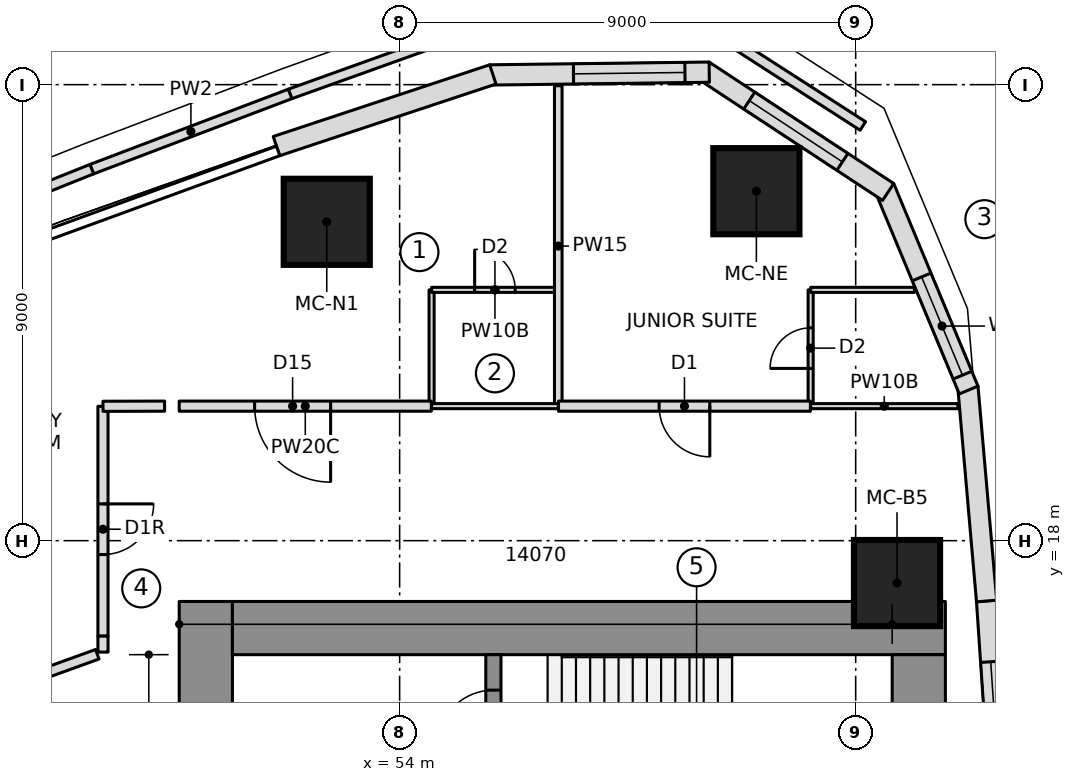
"""IFC4 building model, lengths in metres.
Left out: names, types, materials, properties, quantities, classifications, styles, units other than length and angle.
Written with IfcOpenShell. Run it as: python <this file> out.ifc"""

import sys

from ifc_helpers import new_model, si_unit, direction, frame, frame_2d, origin, origin_2d, place, context, subcontext, project, spatial, polyline, rectangle, outline, extrude, element, fill, save


model = new_model("IFC4")
c1 = context("Model", 3, precision=1e-05, world=origin(), true_north=direction((0.0, 1.0)))
c2 = subcontext(c1, "Body", "Model", "MODEL_VIEW")
j1 = project(units=[si_unit("LENGTHUNIT", "METRE"), si_unit("PLANEANGLEUNIT", "RADIAN")], contexts=[c1])
p1 = place(None, origin())
s1 = spatial("IfcSite", under=j1, at=p1, CompositionType="ELEMENT")
p2 = place(p1, origin())
s2 = spatial("IfcBuilding", under=s1, at=p2, CompositionType="ELEMENT")
p3 = place(p2, frame((0.0, 0.0, 80.3)))
s3 = spatial("IfcBuildingStorey", under=s2, at=p3, CompositionType="ELEMENT", Elevation=80.3)
p4 = place(p3, frame((50.175, 6.65, 0.0), z_axis=(0.0, 0.0, 1.0), x_axis=(0.0, 1.0, 0.0)))
e1 = element("IfcWall", 1, at=p4, inside=s3, PredefinedType="SHEAR", context=c2, shape_type="SweptSolid", body=[
    extrude(rectangle(XDim=10.15, YDim=1.05, at=frame_2d((5.075, 0.0))), origin(), (0.0, 0.0, 1.0), 4.6),
])
p5 = place(p4, frame((6.5, 0.0, 0.0)))
e2 = element("IfcOpeningElement", 2, at=p5, cuts=e1, PredefinedType="OPENING", context=c2, shape_type="SweptSolid", body=[
    extrude(rectangle(XDim=1.1, YDim=2.1, at=frame_2d((0.55, 1.05))), frame((0.0, 0.535, 0.0), z_axis=(0.0, -1.0, 0.0), x_axis=(1.0, 0.0, 0.0)), (0.0, 0.0, 1.0), 1.07),
])
p6 = place(p3, frame((50.7, 16.275, 0.0), z_axis=(0.0, 0.0, 1.0), x_axis=(1.0, 0.0, 0.0)))
e3 = element("IfcWall", 3, at=p6, inside=s3, PredefinedType="SHEAR", context=c2, shape_type="SweptSolid", body=[
    extrude(rectangle(XDim=14.07, YDim=1.05, at=frame_2d((7.035, 0.0))), origin(), (0.0, 0.0, 1.0), 4.6),
])
p7 = place(p3, frame((64.245, 9.389, 0.0), z_axis=(0.0, 0.0, 1.0), x_axis=(0.0, 1.0, 0.0)))
e4 = element("IfcWall", 4, at=p7, inside=s3, PredefinedType="SHEAR", context=c2, shape_type="SweptSolid", body=[
    extrude(rectangle(XDim=6.361, YDim=1.05, at=frame_2d((3.181, 0.0))), origin(), (0.0, 0.0, 1.0), 4.6),
])
p8 = place(p3, frame((55.85, 10.35, 0.0), z_axis=(0.0, 0.0, 1.0), x_axis=(0.0, 1.0, 0.0)))
e5 = element("IfcWall", 5, at=p8, inside=s3, PredefinedType="SHEAR", context=c2, shape_type="SweptSolid", body=[
    extrude(rectangle(XDim=5.4, YDim=0.3, at=frame_2d((2.7, 0.0))), origin(), (0.0, 0.0, 1.0), 4.6),
])
p9 = place(p8, frame((1.43, 0.0, 0.0)))
e6 = element("IfcOpeningElement", 6, at=p9, cuts=e5, PredefinedType="OPENING", context=c2, shape_type="SweptSolid", body=[
    extrude(rectangle(XDim=1.1, YDim=2.1, at=frame_2d((0.55, 1.05))), frame((0.0, 0.16, 0.0), z_axis=(0.0, -1.0, 0.0), x_axis=(1.0, 0.0, 0.0)), (0.0, 0.0, 1.0), 0.32),
])
p10 = place(p8, frame((3.6, 0.0, 0.0)))
e7 = element("IfcOpeningElement", 7, at=p10, cuts=e5, PredefinedType="OPENING", context=c2, shape_type="SweptSolid", body=[
    extrude(rectangle(XDim=1.1, YDim=2.1, at=frame_2d((0.55, 1.05))), frame((0.0, 0.16, 0.0), z_axis=(0.0, -1.0, 0.0), x_axis=(1.0, 0.0, 0.0)), (0.0, 0.0, 1.0), 0.32),
])
for number, where, z_axis, x_axis in (
    (8, (63.816, 17.164, 0.0), (0.0, 0.0, 1.0), (1.0, 0.0, 0.0)),
    (9, (61.04, 24.897, 0.0), (0.0, 0.0, 1.0), (1.0, 0.0, 0.0)),
    (10, (52.562, 24.293, 0.0), (0.0, 0.0, 1.0), (1.0, 0.0, 0.0)),
):
    element("IfcColumn", number, at=place(p3, frame(where, z_axis=z_axis, x_axis=x_axis)), inside=s3, PredefinedType="COLUMN", context=c2, shape_type="SweptSolid", body=[
        extrude(rectangle(XDim=1.7, YDim=1.7, at=origin_2d()), origin(), (0.0, 0.0, 1.0), 4.6),
    ])
p11 = place(p3, frame((65.868, 12.614, 0.0), z_axis=(0.0, 0.0, 1.0), x_axis=(-0.067724559895, 0.997704056315, 0.0)))
e11 = element("IfcWall", 11, at=p11, inside=s3, PredefinedType="NOTDEFINED", context=c2, shape_type="SweptSolid", body=[
    extrude(outline(polyline([(-0.002, -0.2), (4.209, -0.2), (4.205, 0.2), (0.002, 0.2), (-0.002, -0.2)])), origin(), (0.0, 0.0, 1.0), 4.3),
])
p12 = place(p11, frame((1.203, 0.0, 1.8)))
e12 = element("IfcOpeningElement", 12, at=p12, cuts=e11, PredefinedType="OPENING", context=c2, shape_type="SweptSolid", body=[
    extrude(rectangle(XDim=1.8, YDim=1.2, at=frame_2d((0.9, 0.6))), frame((0.0, 0.21, 0.0), z_axis=(0.0, -1.0, 0.0), x_axis=(1.0, 0.0, 0.0)), (0.0, 0.0, 1.0), 0.42),
])
p13 = place(p3, frame((65.583, 16.811, 0.0), z_axis=(0.0, 0.0, 1.0), x_axis=(-0.086992730434, 0.996208946382, 0.0)))
e13 = element("IfcWall", 13, at=p13, inside=s3, PredefinedType="NOTDEFINED", context=c2, shape_type="SweptSolid", body=[
    extrude(outline(polyline([(-0.002, -0.2), (4.238, -0.2), (4.176, 0.2), (0.002, 0.2), (-0.002, -0.2)])), origin(), (0.0, 0.0, 1.0), 4.3),
])
p14 = place(p3, frame((65.217, 21.002, 0.0), z_axis=(0.0, 0.0, 1.0), x_axis=(-0.383997751971, 0.923334027577, 0.0)))
e14 = element("IfcWall", 14, at=p14, inside=s3, PredefinedType="NOTDEFINED", context=c2, shape_type="SweptSolid", body=[
    extrude(outline(polyline([(-0.031, -0.2), (4.3, -0.2), (4.177, 0.2), (0.031, 0.2), (-0.031, -0.2)])), origin(), (0.0, 0.0, 1.0), 4.3),
])
p15 = place(p14, frame((0.287, 0.0, 0.6)))
e15 = element("IfcOpeningElement", 15, at=p15, cuts=e14, PredefinedType="OPENING", context=c2, shape_type="SweptSolid", body=[
    extrude(outline(polyline([(0.0, 1.4), (0.08, 1.802), (0.308, 2.142), (0.648, 2.37), (1.05, 2.45), (1.452, 2.37), (1.792, 2.142), (2.02, 1.802), (2.1, 1.4), (2.1, 1.05), (2.02, 0.648), (1.792, 0.308), (1.452, 0.08), (1.05, 0.0), (0.648, 0.08), (0.308, 0.308), (0.08, 0.648), (0.0, 1.05), (0.0, 1.4)])), frame((0.0, 0.21, 0.0), z_axis=(0.0, -1.0, 0.0), x_axis=(1.0, 0.0, 0.0)), (0.0, 0.0, 1.0), 0.42),
])
p16 = place(p3, frame((63.59, 24.916, 0.0), z_axis=(0.0, 0.0, 1.0), x_axis=(-0.835340523653, 0.549732852887, 0.0)))
e16 = element("IfcWall", 16, at=p16, inside=s3, PredefinedType="NOTDEFINED", context=c2, shape_type="SweptSolid", body=[
    extrude(outline(polyline([(-0.061, -0.2), (4.3, -0.2), (4.178, 0.2), (0.061, 0.2), (-0.061, -0.2)])), origin(), (0.0, 0.0, 1.0), 4.3),
])
p17 = place(p16, frame((1.02, 0.0, 0.6)))
e17 = element("IfcOpeningElement", 17, at=p17, cuts=e16, PredefinedType="OPENING", context=c2, shape_type="SweptSolid", body=[
    extrude(outline(polyline([(0.0, 1.35), (0.084, 1.771), (0.322, 2.128), (0.679, 2.366), (1.1, 2.45), (1.521, 2.366), (1.878, 2.128), (2.116, 1.771), (2.2, 1.35), (2.2, 1.1), (2.116, 0.679), (1.878, 0.322), (1.521, 0.084), (1.1, 0.0), (0.679, 0.084), (0.322, 0.322), (0.084, 0.679), (0.0, 1.1), (0.0, 1.35)])), frame((0.0, 0.21, 0.0), z_axis=(0.0, -1.0, 0.0), x_axis=(1.0, 0.0, 0.0)), (0.0, 0.0, 1.0), 0.42),
])
p18 = place(p3, frame((60.049, 27.246, 0.0), z_axis=(0.0, 0.0, 1.0), x_axis=(-0.999919718849, -0.012671063772, 0.0)))
e18 = element("IfcWall", 18, at=p18, inside=s3, PredefinedType="NOTDEFINED", context=c2, shape_type="SweptSolid", body=[
    extrude(outline(polyline([(-0.061, -0.2), (4.27, -0.2), (4.208, 0.2), (0.061, 0.2), (-0.061, -0.2)])), origin(), (0.0, 0.0, 1.0), 4.3),
])
p19 = place(p18, frame((0.418, 0.0, 0.6)))
e19 = element("IfcOpeningElement", 19, at=p19, cuts=e18, PredefinedType="OPENING", context=c2, shape_type="SweptSolid", body=[
    extrude(outline(polyline([(0.0, 1.35), (0.084, 1.771), (0.322, 2.128), (0.679, 2.366), (1.1, 2.45), (1.521, 2.366), (1.878, 2.128), (2.116, 1.771), (2.2, 1.35), (2.2, 1.1), (2.116, 0.679), (1.878, 0.322), (1.521, 0.084), (1.1, 0.0), (0.679, 0.084), (0.322, 0.322), (0.084, 0.679), (0.0, 1.1), (0.0, 1.35)])), frame((0.0, 0.21, 0.0), z_axis=(0.0, -1.0, 0.0), x_axis=(1.0, 0.0, 0.0)), (0.0, 0.0, 1.0), 0.42),
])
p20 = place(p3, frame((55.81, 27.192, 0.0), z_axis=(0.0, 0.0, 1.0), x_axis=(-0.94925004851, -0.314522408429, 0.0)))
e20 = element("IfcWall", 20, at=p20, inside=s3, PredefinedType="NOTDEFINED", context=c2, shape_type="SweptSolid", body=[
    extrude(outline(polyline([(-0.031, -0.2), (4.468, -0.2), (4.468, 0.2), (0.031, 0.2), (-0.031, -0.2)])), origin(), (0.0, 0.0, 1.0), 4.3),
])
p21 = place(p3, frame((63.141, 26.184, 0.0), z_axis=(0.0, 0.0, 1.0), x_axis=(-0.84093838731, 0.5411308795, 0.0)))
e21 = element("IfcWall", 21, at=p21, inside=s3, PredefinedType="PARAPET", context=c2, shape_type="SweptSolid", body=[
    extrude(rectangle(XDim=3.999, YDim=0.2, at=frame_2d((2.0, 0.0))), origin(), (0.0, 0.0, 1.0), 1.1),
])
p22 = place(p3, frame((55.74, 28.216, 0.0), z_axis=(0.0, 0.0, 1.0), x_axis=(-0.941329520921, -0.337488863584, 0.0)))
e22 = element("IfcWall", 22, at=p22, inside=s3, PredefinedType="PARAPET", context=c2, shape_type="SweptSolid", body=[
    extrude(rectangle(XDim=4.146, YDim=0.2, at=frame_2d((2.073, 0.0))), origin(), (0.0, 0.0, 1.0), 1.1),
])
for number, where, z_axis, x_axis in (
    (23, (51.837, 26.817, 0.0), (0.0, 0.0, 1.0), (-0.935, -0.355, 0.0)),
    (24, (47.924, 25.332, 0.0), (0.0, 0.0, 1.0), (-0.928, -0.372, 0.0)),
):
    element("IfcWall", number, at=place(p3, frame(where, z_axis=z_axis, x_axis=x_axis)), inside=s3, PredefinedType="PARAPET", context=c2, shape_type="SweptSolid", body=[
        extrude(rectangle(XDim=4.186, YDim=0.2, at=frame_2d((2.093, 0.0))), origin(), (0.0, 0.0, 1.0), 1.1),
    ])
p23 = place(p3, frame((54.631, 20.65, 0.0), z_axis=(0.0, 0.0, 1.0), x_axis=(0.0, 1.0, 0.0)))
e25 = element("IfcWall", 25, at=p23, inside=s3, PredefinedType="PARTITIONING", context=c2, shape_type="SweptSolid", body=[
    extrude(rectangle(XDim=2.3, YDim=0.1, at=frame_2d((1.15, 0.0))), origin(), (0.0, 0.0, 1.0), 4.3),
])
p24 = place(p3, frame((54.631, 22.95, 0.0), z_axis=(0.0, 0.0, 1.0), x_axis=(1.0, 0.0, 0.0)))
e26 = element("IfcWall", 26, at=p24, inside=s3, PredefinedType="PARTITIONING", context=c2, shape_type="SweptSolid", body=[
    extrude(rectangle(XDim=2.5, YDim=0.1, at=frame_2d((1.25, 0.0))), origin(), (0.0, 0.0, 1.0), 4.3),
])
p25 = place(p24, frame((0.85, 0.0, 0.0)))
e27 = element("IfcOpeningElement", 27, at=p25, cuts=e26, PredefinedType="OPENING", context=c2, shape_type="SweptSolid", body=[
    extrude(rectangle(XDim=0.8, YDim=2.1, at=frame_2d((0.4, 1.05))), frame((0.0, 0.06, 0.0), z_axis=(0.0, -1.0, 0.0), x_axis=(1.0, 0.0, 0.0)), (0.0, 0.0, 1.0), 0.12),
])
p26 = place(p3, frame((62.111, 20.65, 0.0), z_axis=(0.0, 0.0, 1.0), x_axis=(0.0, 1.0, 0.0)))
e28 = element("IfcWall", 28, at=p26, inside=s3, PredefinedType="PARTITIONING", context=c2, shape_type="SweptSolid", body=[
    extrude(rectangle(XDim=2.3, YDim=0.1, at=frame_2d((1.15, 0.0))), origin(), (0.0, 0.0, 1.0), 4.3),
])
p27 = place(p26, frame((0.75, 0.0, 0.0)))
e29 = element("IfcOpeningElement", 29, at=p27, cuts=e28, PredefinedType="OPENING", context=c2, shape_type="SweptSolid", body=[
    extrude(rectangle(XDim=0.8, YDim=2.1, at=frame_2d((0.4, 1.05))), frame((0.0, 0.06, 0.0), z_axis=(0.0, -1.0, 0.0), x_axis=(1.0, 0.0, 0.0)), (0.0, 0.0, 1.0), 0.12),
])
p28 = place(p3, frame((62.111, 22.95, 0.0), z_axis=(0.0, 0.0, 1.0), x_axis=(1.0, 0.0, 0.0)))
e30 = element("IfcWall", 30, at=p28, inside=s3, PredefinedType="PARTITIONING", context=c2, shape_type="SweptSolid", body=[
    extrude(rectangle(XDim=2.049, YDim=0.1, at=frame_2d((1.025, 0.0))), origin(), (0.0, 0.0, 1.0), 4.3),
])
p29 = place(p3, frame((57.131, 20.65, 0.0), z_axis=(0.0, 0.0, 1.0), x_axis=(0.0, 1.0, 0.0)))
e31 = element("IfcWall", 31, at=p29, inside=s3, PredefinedType="PARTITIONING", context=c2, shape_type="SweptSolid", body=[
    extrude(rectangle(XDim=6.329, YDim=0.15, at=frame_2d((3.165, 0.0))), origin(), (0.0, 0.0, 1.0), 4.3),
])
p30 = place(p3, frame((54.625, 20.655, 0.0), z_axis=(0.0, 0.0, 1.0), x_axis=(-1.0, 0.0, 0.0)))
e32 = element("IfcWall", 32, at=p30, inside=s3, PredefinedType="PARTITIONING", context=c2, shape_type="SweptSolid", body=[
    extrude(rectangle(XDim=4.976, YDim=0.2, at=frame_2d((2.488, 0.0))), origin(), (0.0, 0.0, 1.0), 4.3),
])
p31 = place(p30, frame((1.988, 0.0, 0.0)))
e33 = element("IfcOpeningElement", 33, at=p31, cuts=e32, PredefinedType="OPENING", context=c2, shape_type="SweptSolid", body=[
    extrude(rectangle(XDim=1.5, YDim=2.1, at=frame_2d((0.75, 1.05))), frame((0.0, 0.11, 0.0), z_axis=(0.0, -1.0, 0.0), x_axis=(1.0, 0.0, 0.0)), (0.0, 0.0, 1.0), 0.22),
])
p32 = place(p3, frame((62.106, 20.655, 0.0), z_axis=(0.0, 0.0, 1.0), x_axis=(-1.0, 0.0, 0.0)))
e34 = element("IfcWall", 34, at=p32, inside=s3, PredefinedType="PARTITIONING", context=c2, shape_type="SweptSolid", body=[
    extrude(rectangle(XDim=4.971, YDim=0.2, at=frame_2d((2.485, 0.0))), origin(), (0.0, 0.0, 1.0), 4.3),
])
p33 = place(p32, frame((1.985, 0.0, 0.0)))
e35 = element("IfcOpeningElement", 35, at=p33, cuts=e34, PredefinedType="OPENING", context=c2, shape_type="SweptSolid", body=[
    extrude(rectangle(XDim=1.0, YDim=2.1, at=frame_2d((0.5, 1.05))), frame((0.0, 0.11, 0.0), z_axis=(0.0, -1.0, 0.0), x_axis=(1.0, 0.0, 0.0)), (0.0, 0.0, 1.0), 0.22),
])
p34 = place(p3, frame((57.131, 20.655, 0.0), z_axis=(0.0, 0.0, 1.0), x_axis=(-1.0, 0.0, 0.0)))
e36 = element("IfcWall", 36, at=p34, inside=s3, PredefinedType="PARTITIONING", context=c2, shape_type="SweptSolid", body=[
    extrude(rectangle(XDim=2.5, YDim=0.1, at=frame_2d((1.25, 0.0))), origin(), (0.0, 0.0, 1.0), 4.3),
])
p35 = place(p3, frame((65.017, 20.655, 0.0), z_axis=(0.0, 0.0, 1.0), x_axis=(-1.0, 0.0, 0.0)))
e37 = element("IfcWall", 37, at=p35, inside=s3, PredefinedType="PARTITIONING", context=c2, shape_type="SweptSolid", body=[
    extrude(rectangle(XDim=2.906, YDim=0.1, at=frame_2d((1.453, 0.0))), origin(), (0.0, 0.0, 1.0), 4.3),
])
p36 = place(p3, frame((48.146, 20.652, 0.0), z_axis=(0.0, 0.0, 1.0), x_axis=(-5.3821313e-05, -0.999999998552, 0.0)))
e38 = element("IfcWall", 38, at=p36, inside=s3, PredefinedType="PARTITIONING", context=c2, shape_type="SweptSolid", body=[
    extrude(rectangle(XDim=4.536, YDim=0.2, at=frame_2d((2.268, 0.0))), origin(), (0.0, 0.0, 1.0), 4.3),
])
p37 = place(p36, frame((1.926, 0.0, 0.0)))
e39 = element("IfcOpeningElement", 39, at=p37, cuts=e38, PredefinedType="OPENING", context=c2, shape_type="SweptSolid", body=[
    extrude(rectangle(XDim=1.0, YDim=2.1, at=frame_2d((0.5, 1.05))), frame((0.0, 0.11, 0.0), z_axis=(0.0, -1.0, 0.0), x_axis=(1.0, 0.0, 0.0)), (0.0, 0.0, 1.0), 0.22),
])
p38 = place(p3, frame((49.362, 20.655, 0.0), z_axis=(0.0, 0.0, 1.0), x_axis=(-0.999996595549, -0.002609384934, 0.0)))
e40 = element("IfcWall", 40, at=p38, inside=s3, PredefinedType="PARTITIONING", context=c2, shape_type="SweptSolid", body=[
    extrude(rectangle(XDim=1.216, YDim=0.2, at=frame_2d((0.608, 0.0))), origin(), (0.0, 0.0, 1.0), 4.3),
])
p39 = place(p3, frame((48.145, 16.116, 0.0), z_axis=(0.0, 0.0, 1.0), x_axis=(0.0, -1.0, 0.0)))
e41 = element("IfcWall", 41, at=p39, inside=s3, PredefinedType="PARTITIONING", context=c2, shape_type="SweptSolid", body=[
    extrude(rectangle(XDim=0.315, YDim=0.2, at=frame_2d((0.158, 0.0))), origin(), (0.0, 0.0, 1.0), 4.3),
])
p40 = place(p3, frame((48.033, 15.758, 0.0), z_axis=(0.0, 0.0, 1.0), x_axis=(-0.940233856013, -0.340529434862, 0.0)))
e42 = element("IfcWall", 42, at=p40, inside=s3, PredefinedType="PARTITIONING", context=c2, shape_type="SweptSolid", body=[
    extrude(rectangle(XDim=1.179, YDim=0.2, at=frame_2d((0.59, 0.0))), origin(), (0.0, 0.0, 1.0), 4.3),
])
p41 = place(p12, origin())
e43 = element("IfcWindow", 43, at=p41, inside=s3, PartitioningType="SINGLE_PANEL", PredefinedType="WINDOW", context=c2, shape_type="SweptSolid", body=[
    extrude(rectangle(XDim=1.8, YDim=1.2, at=frame_2d((0.9, 0.6))), frame((0.0, 0.17, 0.0), z_axis=(0.0, -1.0, 0.0), x_axis=(1.0, 0.0, 0.0)), (0.0, 0.0, 1.0), 0.06),
])
fill(e12, e43)
p42 = place(p15, origin())
e44 = element("IfcWindow", 44, at=p42, inside=s3, PartitioningType="SINGLE_PANEL", PredefinedType="WINDOW", context=c2, shape_type="SweptSolid", body=[
    extrude(outline(polyline([(0.0, 1.4), (0.08, 1.802), (0.308, 2.142), (0.648, 2.37), (1.05, 2.45), (1.452, 2.37), (1.792, 2.142), (2.02, 1.802), (2.1, 1.4), (2.1, 1.05), (2.02, 0.648), (1.792, 0.308), (1.452, 0.08), (1.05, 0.0), (0.648, 0.08), (0.308, 0.308), (0.08, 0.648), (0.0, 1.05), (0.0, 1.4)])), frame((0.0, 0.17, 0.0), z_axis=(0.0, -1.0, 0.0), x_axis=(1.0, 0.0, 0.0)), (0.0, 0.0, 1.0), 0.06),
])
fill(e15, e44)
p43 = place(p17, origin())
e45 = element("IfcWindow", 45, at=p43, inside=s3, PartitioningType="SINGLE_PANEL", PredefinedType="WINDOW", context=c2, shape_type="SweptSolid", body=[
    extrude(outline(polyline([(0.0, 1.35), (0.084, 1.771), (0.322, 2.128), (0.679, 2.366), (1.1, 2.45), (1.521, 2.366), (1.878, 2.128), (2.116, 1.771), (2.2, 1.35), (2.2, 1.1), (2.116, 0.679), (1.878, 0.322), (1.521, 0.084), (1.1, 0.0), (0.679, 0.084), (0.322, 0.322), (0.084, 0.679), (0.0, 1.1), (0.0, 1.35)])), frame((0.0, 0.17, 0.0), z_axis=(0.0, -1.0, 0.0), x_axis=(1.0, 0.0, 0.0)), (0.0, 0.0, 1.0), 0.06),
])
fill(e17, e45)
p44 = place(p19, origin())
e46 = element("IfcWindow", 46, at=p44, inside=s3, PartitioningType="SINGLE_PANEL", PredefinedType="WINDOW", context=c2, shape_type="SweptSolid", body=[
    extrude(outline(polyline([(0.0, 1.35), (0.084, 1.771), (0.322, 2.128), (0.679, 2.366), (1.1, 2.45), (1.521, 2.366), (1.878, 2.128), (2.116, 1.771), (2.2, 1.35), (2.2, 1.1), (2.116, 0.679), (1.878, 0.322), (1.521, 0.084), (1.1, 0.0), (0.679, 0.084), (0.322, 0.322), (0.084, 0.679), (0.0, 1.1), (0.0, 1.35)])), frame((0.0, 0.17, 0.0), z_axis=(0.0, -1.0, 0.0), x_axis=(1.0, 0.0, 0.0)), (0.0, 0.0, 1.0), 0.06),
])
fill(e19, e46)
p45 = place(p25, origin())
e47 = element("IfcDoor", 47, at=p45, inside=s3, OperationType="SINGLE_SWING_LEFT", PredefinedType="DOOR", context=c2, shape_type="SweptSolid", body=[
    extrude(rectangle(XDim=0.8, YDim=2.1, at=frame_2d((0.4, 1.05))), frame((0.0, 0.025, 0.0), z_axis=(0.0, -1.0, 0.0), x_axis=(1.0, 0.0, 0.0)), (0.0, 0.0, 1.0), 0.05),
])
fill(e27, e47)
p46 = place(p27, origin())
e48 = element("IfcDoor", 48, at=p46, inside=s3, OperationType="SINGLE_SWING_LEFT", PredefinedType="DOOR", context=c2, shape_type="SweptSolid", body=[
    extrude(rectangle(XDim=0.8, YDim=2.1, at=frame_2d((0.4, 1.05))), frame((0.0, 0.025, 0.0), z_axis=(0.0, -1.0, 0.0), x_axis=(1.0, 0.0, 0.0)), (0.0, 0.0, 1.0), 0.05),
])
fill(e29, e48)
p47 = place(p31, origin())
e49 = element("IfcDoor", 49, at=p47, inside=s3, OperationType="DOUBLE_DOOR_SINGLE_SWING", PredefinedType="DOOR", context=c2, shape_type="SweptSolid", body=[
    extrude(rectangle(XDim=1.5, YDim=2.1, at=frame_2d((0.75, 1.05))), frame((0.0, 0.025, 0.0), z_axis=(0.0, -1.0, 0.0), x_axis=(1.0, 0.0, 0.0)), (0.0, 0.0, 1.0), 0.05),
])
fill(e33, e49)
p48 = place(p33, origin())
e50 = element("IfcDoor", 50, at=p48, inside=s3, OperationType="SINGLE_SWING_LEFT", PredefinedType="DOOR", context=c2, shape_type="SweptSolid", body=[
    extrude(rectangle(XDim=1.0, YDim=2.1, at=frame_2d((0.5, 1.05))), frame((0.0, 0.025, 0.0), z_axis=(0.0, -1.0, 0.0), x_axis=(1.0, 0.0, 0.0)), (0.0, 0.0, 1.0), 0.05),
])
fill(e35, e50)
p49 = place(p37, origin())
e51 = element("IfcDoor", 51, at=p49, inside=s3, OperationType="SINGLE_SWING_RIGHT", PredefinedType="DOOR", context=c2, shape_type="SweptSolid", body=[
    extrude(rectangle(XDim=1.0, YDim=2.1, at=frame_2d((0.5, 1.05))), frame((0.0, 0.025, 0.0), z_axis=(0.0, -1.0, 0.0), x_axis=(1.0, 0.0, 0.0)), (0.0, 0.0, 1.0), 0.05),
])
fill(e39, e51)
p50 = place(p10, origin())
e52 = element("IfcDoor", 52, at=p50, inside=s3, OperationType="SINGLE_SWING_RIGHT", PredefinedType="DOOR", context=c2, shape_type="SweptSolid", body=[
    extrude(rectangle(XDim=1.1, YDim=2.1, at=frame_2d((0.55, 1.05))), frame((0.0, 0.025, 0.0), z_axis=(0.0, -1.0, 0.0), x_axis=(1.0, 0.0, 0.0)), (0.0, 0.0, 1.0), 0.05),
])
fill(e7, e52)
save(model, sys.argv[1])
